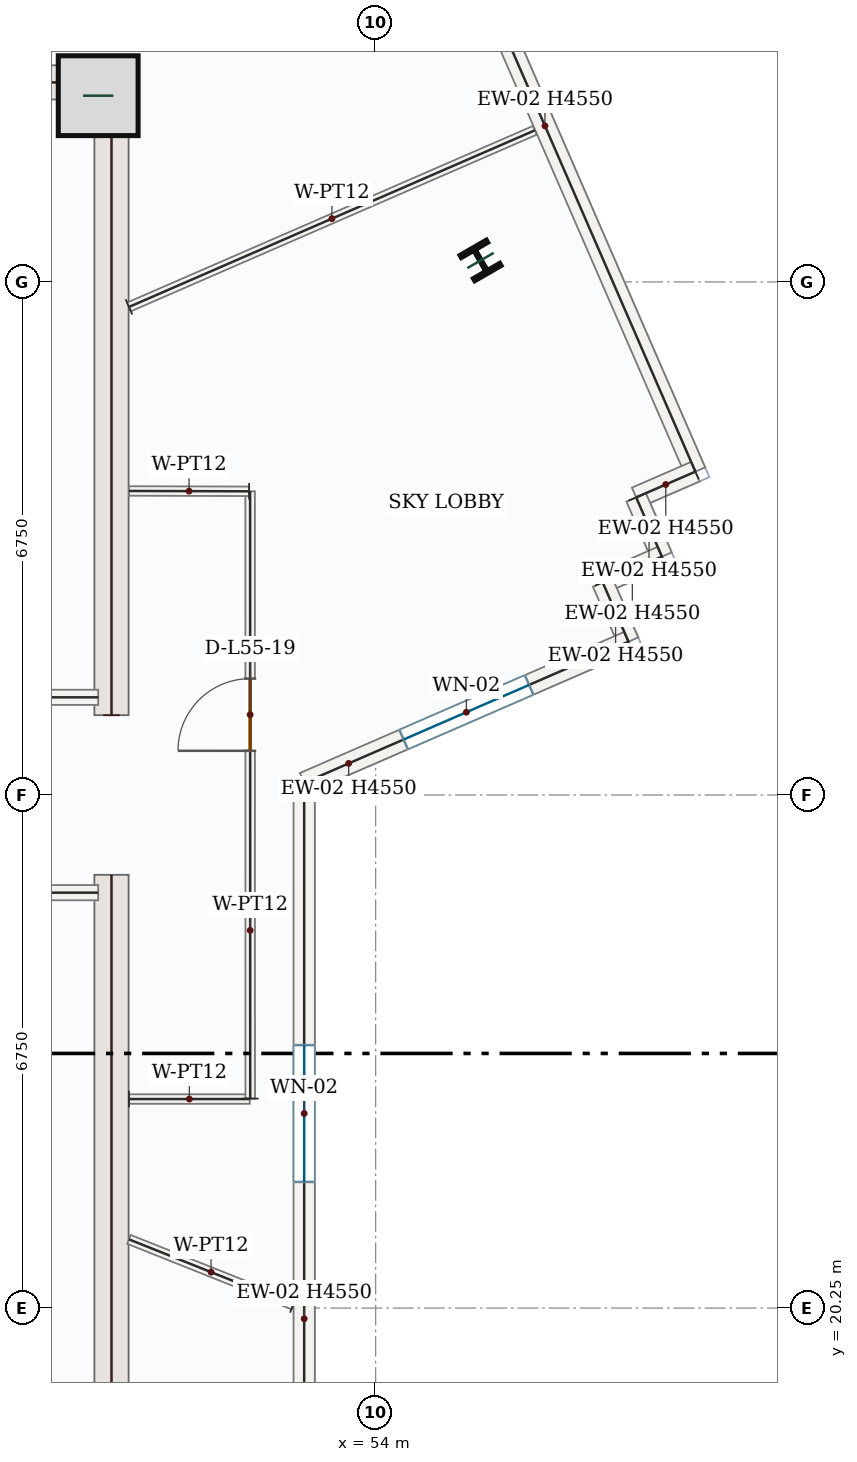
"""IFC4 building model, lengths in metres.
Left out: names, types, materials, properties, quantities, classifications, styles, units other than length and angle.
Written with IfcOpenShell. Run it as: python <this file> out.ifc"""

import sys

from ifc_helpers import new_model, si_unit, direction, frame, frame_2d, origin, origin_2d, place, context, subcontext, project, spatial, rectangle, i_section, extrude, source, transform, mapped, element, fill, save


model = new_model("IFC4")
c1 = context("Model", 3, precision=1e-05, world=origin(), true_north=direction((0.0, 1.0)))
c2 = subcontext(c1, "Body", "Model", "MODEL_VIEW")
j1 = project(units=[si_unit("LENGTHUNIT", "METRE"), si_unit("PLANEANGLEUNIT", "RADIAN")], contexts=[c1])
p1 = place(None, origin())
s1 = spatial("IfcSite", under=j1, at=p1, CompositionType="ELEMENT")
p2 = place(p1, origin())
s2 = spatial("IfcBuilding", under=s1, at=p2, CompositionType="ELEMENT")
p3 = place(p2, frame((0.0, 0.0, 234.3)))
s3 = spatial("IfcBuildingStorey", under=s2, at=p3, CompositionType="ELEMENT", Elevation=234.3)
m1 = source(origin(), c2, "Body", "SweptSolid", [
    extrude(rectangle(XDim=8.55, YDim=0.45, at=frame_2d((4.275, 0.0))), origin(), (0.0, 0.0, 1.0), 4.55),
])
for number, where, z_axis, x_axis in (
    (1, (50.525, 17.4, 0.0), (0.0, 0.0, 1.0), (0.0, 1.0, 0.0)),
    (2, (50.525, 28.05, 0.0), (0.0, 0.0, 1.0), (0.0, 1.0, 0.0)),
):
    element("IfcWall", number, at=place(p3, frame(where, z_axis=z_axis, x_axis=x_axis)), inside=s3, PredefinedType="SHEAR", context=c2, shape_type="MappedRepresentation", body=[
        mapped(m1, transform((0.0, 0.0, 0.0), x_axis=(1.0, 0.0, 0.0), y_axis=(0.0, 1.0, 0.0), z_axis=(0.0, 0.0, 1.0), scale=1.0)),
    ])
m2 = source(origin(), c2, "Body", "SweptSolid", [
    extrude(rectangle(XDim=7.1, YDim=0.45, at=frame_2d((3.55, 0.0))), origin(), (0.0, 0.0, 1.0), 4.55),
])
p4 = place(p3, frame((43.2, 36.375, 0.0), z_axis=(0.0, 0.0, 1.0), x_axis=(1.0, 0.0, 0.0)))
e3 = element("IfcWall", 3, at=p4, inside=s3, PredefinedType="SHEAR", context=c2, shape_type="MappedRepresentation", body=[
    mapped(m2, transform((0.0, 0.0, 0.0), x_axis=(1.0, 0.0, 0.0), y_axis=(0.0, 1.0, 0.0), z_axis=(0.0, 0.0, 1.0), scale=1.0)),
])
m3 = source(origin(), c2, "Body", "SweptSolid", [
    extrude(rectangle(XDim=1.05, YDim=1.05, at=origin_2d()), origin(), (0.0, 0.0, 1.0), 4.8),
])
p5 = place(p3, frame((50.35, 36.2, 0.0), z_axis=(0.0, 0.0, 1.0), x_axis=(1.0, 0.0, 0.0)))
e4 = element("IfcColumn", 4, at=p5, inside=s3, PredefinedType="COLUMN", context=c2, shape_type="MappedRepresentation", body=[
    mapped(m3, transform((0.0, 0.0, 0.0), x_axis=(1.0, 0.0, 0.0), y_axis=(0.0, 1.0, 0.0), z_axis=(0.0, 0.0, 1.0), scale=1.0)),
])
m4 = source(origin(), c2, "Body", "SweptSolid", [
    extrude(i_section(OverallWidth=0.399, OverallDepth=0.386, WebThickness=0.021, FlangeThickness=0.033, FilletRadius=0.018, at=origin_2d()), origin(), (0.0, 0.0, 1.0), 4.8),
])
p6 = place(p3, frame((55.38, 34.032, 0.0), z_axis=(0.0, 0.0, 1.0), x_axis=(0.866025403784, 0.5, 0.0)))
e5 = element("IfcColumn", 5, at=p6, inside=s3, PredefinedType="COLUMN", context=c2, shape_type="MappedRepresentation", body=[
    mapped(m4, transform((0.0, 0.0, 0.0), x_axis=(1.0, 0.0, 0.0), y_axis=(0.0, 1.0, 0.0), z_axis=(0.0, 0.0, 1.0), scale=1.0)),
])
m5 = source(origin(), c2, "Body", "SweptSolid", [
    extrude(rectangle(XDim=9.92, YDim=0.28, at=frame_2d((4.96, 0.0))), origin(), (0.0, 0.0, 1.0), 4.55),
])
p7 = place(p3, frame((54.249, 40.35, 0.0), z_axis=(0.0, 0.0, 1.0), x_axis=(0.398992471769, -0.916954201404, 0.0)))
e6 = element("IfcWall", 6, at=p7, inside=s3, PredefinedType="SOLIDWALL", context=c2, shape_type="MappedRepresentation", body=[
    mapped(m5, transform((0.0, 0.0, 0.0), x_axis=(1.0, 0.0, 0.0), y_axis=(0.0, 1.0, 0.0), z_axis=(0.0, 0.0, 1.0), scale=1.0)),
])
m6 = source(origin(), c2, "Body", "SweptSolid", [
    extrude(rectangle(XDim=0.85, YDim=0.28, at=frame_2d((0.425, 0.0))), origin(), (0.0, 0.0, 1.0), 4.55),
])
for number, where, z_axis, x_axis in (
    (7, (58.207, 31.254, 0.0), (0.0, 0.0, 1.0), (-0.917, -0.399, 0.0)),
    (8, (57.427, 30.915, 0.0), (0.0, 0.0, 1.0), (0.399, -0.917, 0.0)),
):
    element("IfcWall", number, at=place(p3, frame(where, z_axis=z_axis, x_axis=x_axis)), inside=s3, PredefinedType="SOLIDWALL", context=c2, shape_type="MappedRepresentation", body=[
        mapped(m6, transform((0.0, 0.0, 0.0), x_axis=(1.0, 0.0, 0.0), y_axis=(0.0, 1.0, 0.0), z_axis=(0.0, 0.0, 1.0), scale=1.0)),
    ])
m7 = source(origin(), c2, "Body", "SweptSolid", [
    extrude(rectangle(XDim=0.85, YDim=0.28, at=frame_2d((0.425, 0.0))), origin(), (0.0, 0.0, 1.0), 4.55),
])
p8 = place(p3, frame((57.767, 30.136, 0.0), z_axis=(0.0, 0.0, 1.0), x_axis=(-0.916841582309, -0.399251190291, 0.0)))
e9 = element("IfcWall", 9, at=p8, inside=s3, PredefinedType="SOLIDWALL", context=c2, shape_type="MappedRepresentation", body=[
    mapped(m7, transform((0.0, 0.0, 0.0), x_axis=(1.0, 0.0, 0.0), y_axis=(0.0, 1.0, 0.0), z_axis=(0.0, 0.0, 1.0), scale=1.0)),
])
p9 = place(p3, frame((56.987, 29.796, 0.0), z_axis=(0.0, 0.0, 1.0), x_axis=(0.399009702756, -0.916946703526, 0.0)))
e10 = element("IfcWall", 10, at=p9, inside=s3, PredefinedType="SOLIDWALL", context=c2, shape_type="MappedRepresentation", body=[
    mapped(m6, transform((0.0, 0.0, 0.0), x_axis=(1.0, 0.0, 0.0), y_axis=(0.0, 1.0, 0.0), z_axis=(0.0, 0.0, 1.0), scale=1.0)),
])
p10 = place(p3, frame((57.326, 29.017, 0.0), z_axis=(0.0, 0.0, 1.0), x_axis=(-0.916951557096, -0.398998548793, 0.0)))
e11 = element("IfcWall", 11, at=p10, inside=s3, PredefinedType="SOLIDWALL", context=c2, shape_type="SweptSolid", body=[
    extrude(rectangle(XDim=4.653, YDim=0.28, at=frame_2d((2.326, 0.0))), origin(), (0.0, 0.0, 1.0), 4.55),
])
p11 = place(p10, frame((1.426, 0.0, 0.85)))
e12 = element("IfcOpeningElement", 12, at=p11, cuts=e11, PredefinedType="OPENING", context=c2, shape_type="SweptSolid", body=[
    extrude(rectangle(XDim=1.8, YDim=1.75, at=frame_2d((0.9, 0.875))), frame((0.0, 0.15, 0.0), z_axis=(0.0, -1.0, 0.0), x_axis=(1.0, 0.0, 0.0)), (0.0, 0.0, 1.0), 0.3),
])
p12 = place(p3, frame((53.06, 27.161, 0.0), z_axis=(0.0, 0.0, 1.0), x_axis=(0.0, -1.0, 0.0)))
e13 = element("IfcWall", 13, at=p12, inside=s3, PredefinedType="SOLIDWALL", context=c2, shape_type="SweptSolid", body=[
    extrude(rectangle(XDim=8.703, YDim=0.28, at=frame_2d((4.351, 0.0))), origin(), (0.0, 0.0, 1.0), 4.55),
])
p13 = place(p12, frame((3.451, 0.0, 0.85)))
e14 = element("IfcOpeningElement", 14, at=p13, cuts=e13, PredefinedType="OPENING", context=c2, shape_type="SweptSolid", body=[
    extrude(rectangle(XDim=1.8, YDim=1.75, at=frame_2d((0.9, 0.875))), frame((0.0, 0.15, 0.0), z_axis=(0.0, -1.0, 0.0), x_axis=(1.0, 0.0, 0.0)), (0.0, 0.0, 1.0), 0.3),
])
m8 = source(origin(), c2, "Body", "SweptSolid", [
    extrude(rectangle(XDim=4.25, YDim=0.2, at=frame_2d((2.125, 0.0))), origin(), (0.0, 0.0, 1.0), 4.55),
])
for number, where, z_axis, x_axis in (
    (15, (46.1, 25.715, 0.0), (0.0, 0.0, 1.0), (1.0, 0.0, 0.0)),
    (16, (46.1, 28.285, 0.0), (0.0, 0.0, 1.0), (1.0, 0.0, 0.0)),
):
    element("IfcWall", number, at=place(p3, frame(where, z_axis=z_axis, x_axis=x_axis)), inside=s3, PredefinedType="SOLIDWALL", context=c2, shape_type="MappedRepresentation", body=[
        mapped(m8, transform((0.0, 0.0, 0.0), x_axis=(1.0, 0.0, 0.0), y_axis=(0.0, 1.0, 0.0), z_axis=(0.0, 0.0, 1.0), scale=1.0)),
    ])
m9 = source(origin(), c2, "Body", "SweptSolid", [
    extrude(rectangle(XDim=1.589, YDim=0.125, at=frame_2d((0.794, 0.0))), origin(), (0.0, 0.0, 1.0), 4.55),
])
p14 = place(p3, frame((50.755, 23.0, 0.0), z_axis=(0.0, 0.0, 1.0), x_axis=(1.0, 0.0, 0.0)))
e17 = element("IfcWall", 17, at=p14, inside=s3, PredefinedType="PARTITIONING", context=c2, shape_type="MappedRepresentation", body=[
    mapped(m9, transform((0.0, 0.0, 0.0), x_axis=(1.0, 0.0, 0.0), y_axis=(0.0, 1.0, 0.0), z_axis=(0.0, 0.0, 1.0), scale=1.0)),
])
p15 = place(p3, frame((52.35, 23.006, 0.0), z_axis=(0.0, 0.0, 1.0), x_axis=(-0.000152793055, 0.999999988327, 0.0)))
e18 = element("IfcWall", 18, at=p15, inside=s3, PredefinedType="PARTITIONING", context=c2, shape_type="SweptSolid", body=[
    extrude(rectangle(XDim=7.989, YDim=0.125, at=frame_2d((3.995, 0.0))), origin(), (0.0, 0.0, 1.0), 4.55),
])
p16 = place(p15, frame((4.575, 0.0, 0.0)))
e19 = element("IfcOpeningElement", 19, at=p16, cuts=e18, PredefinedType="OPENING", context=c2, shape_type="SweptSolid", body=[
    extrude(rectangle(XDim=0.95, YDim=2.15, at=frame_2d((0.475, 1.075))), frame((0.0, 0.073, 0.0), z_axis=(0.0, -1.0, 0.0), x_axis=(1.0, 0.0, 0.0)), (0.0, 0.0, 1.0), 0.145),
])
m10 = source(origin(), c2, "Body", "SweptSolid", [
    extrude(rectangle(XDim=1.581, YDim=0.125, at=frame_2d((0.79, 0.0))), origin(), (0.0, 0.0, 1.0), 4.55),
])
p17 = place(p3, frame((52.335, 30.995, 0.0), z_axis=(0.0, 0.0, 1.0), x_axis=(-0.999995693455, 0.002934803549, 0.0)))
e20 = element("IfcWall", 20, at=p17, inside=s3, PredefinedType="PARTITIONING", context=c2, shape_type="MappedRepresentation", body=[
    mapped(m10, transform((0.0, 0.0, 0.0), x_axis=(1.0, 0.0, 0.0), y_axis=(0.0, 1.0, 0.0), z_axis=(0.0, 0.0, 1.0), scale=1.0)),
])
m11 = source(origin(), c2, "Body", "SweptSolid", [
    extrude(rectangle(XDim=5.823, YDim=0.125, at=frame_2d((2.912, 0.0))), origin(), (0.0, 0.0, 1.0), 4.55),
])
p18 = place(p3, frame((50.755, 33.421, 0.0), z_axis=(0.0, 0.0, 1.0), x_axis=(0.916956044868, 0.398988235141, 0.0)))
e21 = element("IfcWall", 21, at=p18, inside=s3, PredefinedType="PARTITIONING", context=c2, shape_type="MappedRepresentation", body=[
    mapped(m11, transform((0.0, 0.0, 0.0), x_axis=(1.0, 0.0, 0.0), y_axis=(0.0, 1.0, 0.0), z_axis=(0.0, 0.0, 1.0), scale=1.0)),
])
m12 = source(origin(), c2, "Body", "SweptSolid", [
    extrude(rectangle(XDim=2.326, YDim=0.125, at=frame_2d((1.163, 0.0))), origin(), (0.0, 0.0, 1.0), 4.55),
])
p19 = place(p3, frame((52.915, 20.292, 0.0), z_axis=(0.0, 0.0, 1.0), x_axis=(-0.928809338362, 0.370557975183, 0.0)))
e22 = element("IfcWall", 22, at=p19, inside=s3, PredefinedType="PARTITIONING", context=c2, shape_type="MappedRepresentation", body=[
    mapped(m12, transform((0.0, 0.0, 0.0), x_axis=(1.0, 0.0, 0.0), y_axis=(0.0, 1.0, 0.0), z_axis=(0.0, 0.0, 1.0), scale=1.0)),
])
m13 = source(origin(), c2, "Body", "SweptSolid", [
    extrude(rectangle(XDim=1.8, YDim=1.75, at=frame_2d((0.9, 0.875))), frame((0.0, 0.03, 0.0), z_axis=(0.0, -1.0, 0.0), x_axis=(1.0, 0.0, 0.0)), (0.0, 0.0, 1.0), 0.06),
])
p20 = place(p11, origin())
e23 = element("IfcWindow", 23, at=p20, inside=s3, PartitioningType="DOUBLE_PANEL_VERTICAL", PredefinedType="WINDOW", context=c2, shape_type="MappedRepresentation", body=[
    mapped(m13, transform((0.0, 0.0, 0.0), x_axis=(1.0, 0.0, 0.0), y_axis=(0.0, 1.0, 0.0), z_axis=(0.0, 0.0, 1.0), scale=1.0)),
])
fill(e12, e23)
p21 = place(p13, origin())
e24 = element("IfcWindow", 24, at=p21, inside=s3, PartitioningType="DOUBLE_PANEL_VERTICAL", PredefinedType="WINDOW", context=c2, shape_type="MappedRepresentation", body=[
    mapped(m13, transform((0.0, 0.0, 0.0), x_axis=(1.0, 0.0, 0.0), y_axis=(0.0, 1.0, 0.0), z_axis=(0.0, 0.0, 1.0), scale=1.0)),
])
fill(e14, e24)
m14 = source(origin(), c2, "Body", "SweptSolid", [
    extrude(rectangle(XDim=0.95, YDim=2.15, at=frame_2d((0.475, 1.075))), frame((0.0, 0.025, 0.0), z_axis=(0.0, -1.0, 0.0), x_axis=(1.0, 0.0, 0.0)), (0.0, 0.0, 1.0), 0.05),
])
p22 = place(p16, origin())
e25 = element("IfcDoor", 25, at=p22, inside=s3, OperationType="SINGLE_SWING_LEFT", PredefinedType="DOOR", context=c2, shape_type="MappedRepresentation", body=[
    mapped(m14, transform((0.0, 0.0, 0.0), x_axis=(1.0, 0.0, 0.0), y_axis=(0.0, 1.0, 0.0), z_axis=(0.0, 0.0, 1.0), scale=1.0)),
])
fill(e19, e25)
save(model, sys.argv[1])
